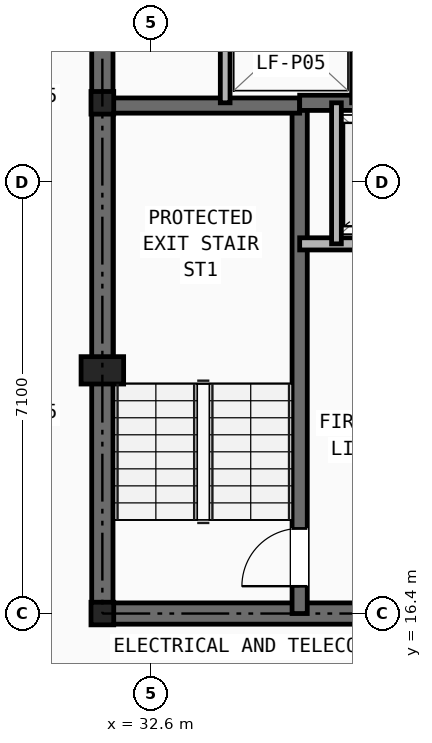
"""IFC4 building model, lengths in metres.
Left out: names, types, materials, properties, quantities, classifications, styles, units other than length and angle.
Written with IfcOpenShell. Run it as: python <this file> out.ifc"""

import sys

from ifc_helpers import new_model, si_unit, direction, frame, frame_2d, origin, origin_2d, place, context, subcontext, project, spatial, rectangle, i_section, extrude, element, fill, save


model = new_model("IFC4")
c1 = context("Model", 3, precision=1e-05, world=origin(), true_north=direction((0.0, 1.0)))
c2 = subcontext(c1, "Body", "Model", "MODEL_VIEW")
j1 = project(units=[si_unit("LENGTHUNIT", "METRE"), si_unit("PLANEANGLEUNIT", "RADIAN")], contexts=[c1])
p1 = place(None, origin())
s1 = spatial("IfcSite", under=j1, at=p1, CompositionType="ELEMENT")
p2 = place(p1, origin())
s2 = spatial("IfcBuilding", under=s1, at=p2, CompositionType="ELEMENT")
p3 = place(p2, frame((0.0, 0.0, 108.6)))
s3 = spatial("IfcBuildingStorey", under=s2, at=p3, CompositionType="ELEMENT", Elevation=108.6)
for number, where, z_axis, x_axis in (
    (1, (31.8, 16.4, 0.0), (0.0, 0.0, 1.0), (1.0, 0.0, 0.0)),
    (2, (31.8, 24.8, 0.0), (0.0, 0.0, 1.0), (1.0, 0.0, 0.0)),
):
    element("IfcColumn", number, at=place(p3, frame(where, z_axis=z_axis, x_axis=x_axis)), inside=s3, PredefinedType="COLUMN", context=c2, shape_type="SweptSolid", body=[
        extrude(i_section(OverallWidth=0.374, OverallDepth=0.372, WebThickness=0.016, FlangeThickness=0.026, at=origin_2d()), origin(), (0.0, 0.0, 1.0), 3.2),
    ])
p4 = place(p3, frame((31.8, 20.4, 0.0), z_axis=(0.0, 0.0, 1.0), x_axis=(1.0, 0.0, 0.0)))
e3 = element("IfcColumn", 3, at=p4, inside=s3, PredefinedType="PILASTER", context=c2, shape_type="SweptSolid", body=[
    extrude(rectangle(XDim=0.7, YDim=0.45, at=origin_2d()), origin(), (0.0, 0.0, 1.0), 3.2),
])
p5 = place(p3, frame((31.8, 16.4, 0.0), z_axis=(0.0, 0.0, 1.0), x_axis=(1.0, 0.0, 0.0)))
e4 = element("IfcWall", 4, at=p5, inside=s3, PredefinedType="SHEAR", context=c2, shape_type="SweptSolid", body=[
    extrude(rectangle(XDim=16.4, YDim=0.35, at=frame_2d((8.2, 0.0))), origin(), (0.0, 0.0, 1.0), 2.94),
])
p6 = place(p5, frame((7.75, 0.0, 0.0)))
e5 = element("IfcOpeningElement", 5, at=p6, cuts=e4, PredefinedType="OPENING", context=c2, shape_type="SweptSolid", body=[
    extrude(rectangle(XDim=0.9, YDim=2.1, at=frame_2d((0.45, 1.05))), frame((0.0, 0.185, 0.0), z_axis=(0.0, -1.0, 0.0), x_axis=(1.0, 0.0, 0.0)), (0.0, 0.0, 1.0), 0.37),
])
p7 = place(p5, frame((4.2, 0.0, 0.0)))
e6 = element("IfcOpeningElement", 6, at=p7, cuts=e4, PredefinedType="OPENING", context=c2, shape_type="SweptSolid", body=[
    extrude(rectangle(XDim=0.95, YDim=2.1, at=frame_2d((0.475, 1.05))), frame((0.0, 0.185, 0.0), z_axis=(0.0, -1.0, 0.0), x_axis=(1.0, 0.0, 0.0)), (0.0, 0.0, 1.0), 0.37),
])
p8 = place(p5, frame((10.6, 0.0, 0.0)))
e7 = element("IfcOpeningElement", 7, at=p8, cuts=e4, PredefinedType="OPENING", context=c2, shape_type="SweptSolid", body=[
    extrude(rectangle(XDim=0.95, YDim=2.1, at=frame_2d((0.475, 1.05))), frame((0.0, 0.185, 0.0), z_axis=(0.0, -1.0, 0.0), x_axis=(1.0, 0.0, 0.0)), (0.0, 0.0, 1.0), 0.37),
])
p9 = place(p3, frame((31.8, 16.4, 0.0), z_axis=(0.0, 0.0, 1.0), x_axis=(0.0, 1.0, 0.0)))
e8 = element("IfcWall", 8, at=p9, inside=s3, PredefinedType="SHEAR", context=c2, shape_type="SweptSolid", body=[
    extrude(rectangle(XDim=14.8, YDim=0.35, at=frame_2d((7.4, 0.0))), origin(), (0.0, 0.0, 1.0), 2.94),
])
p10 = place(p9, frame((11.0, 0.0, 0.0)))
e9 = element("IfcOpeningElement", 9, at=p10, cuts=e8, PredefinedType="OPENING", context=c2, shape_type="SweptSolid", body=[
    extrude(rectangle(XDim=1.1, YDim=2.15, at=frame_2d((0.55, 1.075))), frame((0.0, 0.185, 0.0), z_axis=(0.0, -1.0, 0.0), x_axis=(1.0, 0.0, 0.0)), (0.0, 0.0, 1.0), 0.37),
])
p11 = place(p3, frame((35.045, 16.4, 0.0), z_axis=(0.0, 0.0, 1.0), x_axis=(0.0, 1.0, 0.0)))
e10 = element("IfcWall", 10, at=p11, inside=s3, PredefinedType="SHEAR", context=c2, shape_type="SweptSolid", body=[
    extrude(rectangle(XDim=8.4, YDim=0.25, at=frame_2d((4.2, 0.0))), origin(), (0.0, 0.0, 1.0), 2.94),
])
p12 = place(p11, frame((0.45, 0.0, 0.0)))
e11 = element("IfcOpeningElement", 11, at=p12, cuts=e10, PredefinedType="OPENING", context=c2, shape_type="SweptSolid", body=[
    extrude(rectangle(XDim=0.95, YDim=2.1, at=frame_2d((0.475, 1.05))), frame((0.0, 0.135, 0.0), z_axis=(0.0, -1.0, 0.0), x_axis=(1.0, 0.0, 0.0)), (0.0, 0.0, 1.0), 0.27),
])
p13 = place(p3, frame((31.8, 24.755, 0.0), z_axis=(0.0, 0.0, 1.0), x_axis=(1.0, 0.0, 0.0)))
e12 = element("IfcWall", 12, at=p13, inside=s3, PredefinedType="SHEAR", context=c2, shape_type="SweptSolid", body=[
    extrude(rectangle(XDim=3.245, YDim=0.25, at=frame_2d((1.623, 0.0))), origin(), (0.0, 0.0, 1.0), 2.94),
])
p14 = place(p3, frame((35.045, 24.8, 0.0), z_axis=(0.0, 0.0, 1.0), x_axis=(1.0, 0.0, 0.0)))
e13 = element("IfcWall", 13, at=p14, inside=s3, PredefinedType="SHEAR", context=c2, shape_type="SweptSolid", body=[
    extrude(rectangle(XDim=9.91, YDim=0.25, at=frame_2d((4.955, 0.0))), origin(), (0.0, 0.0, 1.0), 2.94),
])
p15 = place(p3, frame((35.045, 22.48, 0.0), z_axis=(0.0, 0.0, 1.0), x_axis=(1.0, 0.0, 0.0)))
e14 = element("IfcWall", 14, at=p15, inside=s3, PredefinedType="SOLIDWALL", context=c2, shape_type="SweptSolid", body=[
    extrude(rectangle(XDim=9.91, YDim=0.2, at=frame_2d((4.955, 0.0))), origin(), (0.0, 0.0, 1.0), 2.94),
])
p16 = place(p15, frame((1.255, 0.0, 0.0)))
e15 = element("IfcOpeningElement", 15, at=p16, cuts=e14, PredefinedType="OPENING", context=c2, shape_type="SweptSolid", body=[
    extrude(rectangle(XDim=1.1, YDim=2.15, at=frame_2d((0.55, 1.075))), frame((0.0, 0.11, 0.0), z_axis=(0.0, -1.0, 0.0), x_axis=(1.0, 0.0, 0.0)), (0.0, 0.0, 1.0), 0.22),
])
p17 = place(p15, frame((7.555, 0.0, 0.0)))
e16 = element("IfcOpeningElement", 16, at=p17, cuts=e14, PredefinedType="OPENING", context=c2, shape_type="SweptSolid", body=[
    extrude(rectangle(XDim=1.1, YDim=2.15, at=frame_2d((0.55, 1.075))), frame((0.0, 0.11, 0.0), z_axis=(0.0, -1.0, 0.0), x_axis=(1.0, 0.0, 0.0)), (0.0, 0.0, 1.0), 0.22),
])
p18 = place(p15, frame((4.405, 0.0, 0.0)))
e17 = element("IfcOpeningElement", 17, at=p18, cuts=e14, PredefinedType="OPENING", context=c2, shape_type="SweptSolid", body=[
    extrude(rectangle(XDim=1.1, YDim=2.15, at=frame_2d((0.55, 1.075))), frame((0.0, 0.11, 0.0), z_axis=(0.0, -1.0, 0.0), x_axis=(1.0, 0.0, 0.0)), (0.0, 0.0, 1.0), 0.22),
])
p19 = place(p3, frame((35.65, 22.48, 0.0), z_axis=(0.0, 0.0, 1.0), x_axis=(0.0, 1.0, 0.0)))
e18 = element("IfcWall", 18, at=p19, inside=s3, PredefinedType="SOLIDWALL", context=c2, shape_type="SweptSolid", body=[
    extrude(rectangle(XDim=2.32, YDim=0.16, at=frame_2d((1.16, 0.0))), origin(), (0.0, 0.0, 1.0), 2.94),
])
for number, where, z_axis, x_axis in (
    (19, (33.82, 24.8, 0.0), (0.0, 0.0, 1.0), (0.0, 1.0, 0.0)),
    (20, (35.98, 24.8, 0.0), (0.0, 0.0, 1.0), (0.0, 1.0, 0.0)),
):
    element("IfcWall", number, at=place(p3, frame(where, z_axis=z_axis, x_axis=x_axis)), inside=s3, PredefinedType="SOLIDWALL", context=c2, shape_type="SweptSolid", body=[
        extrude(rectangle(XDim=2.08, YDim=0.16, at=frame_2d((1.04, 0.0))), origin(), (0.0, 0.0, 1.0), 2.94),
    ])
p20 = place(p12, origin())
e21 = element("IfcDoor", 21, at=p20, inside=s3, OperationType="SINGLE_SWING_LEFT", PredefinedType="DOOR", context=c2, shape_type="SweptSolid", body=[
    extrude(rectangle(XDim=0.95, YDim=2.1, at=frame_2d((0.475, 1.05))), frame((0.0, 0.025, 0.0), z_axis=(0.0, -1.0, 0.0), x_axis=(1.0, 0.0, 0.0)), (0.0, 0.0, 1.0), 0.05),
])
fill(e11, e21)
save(model, sys.argv[1])
